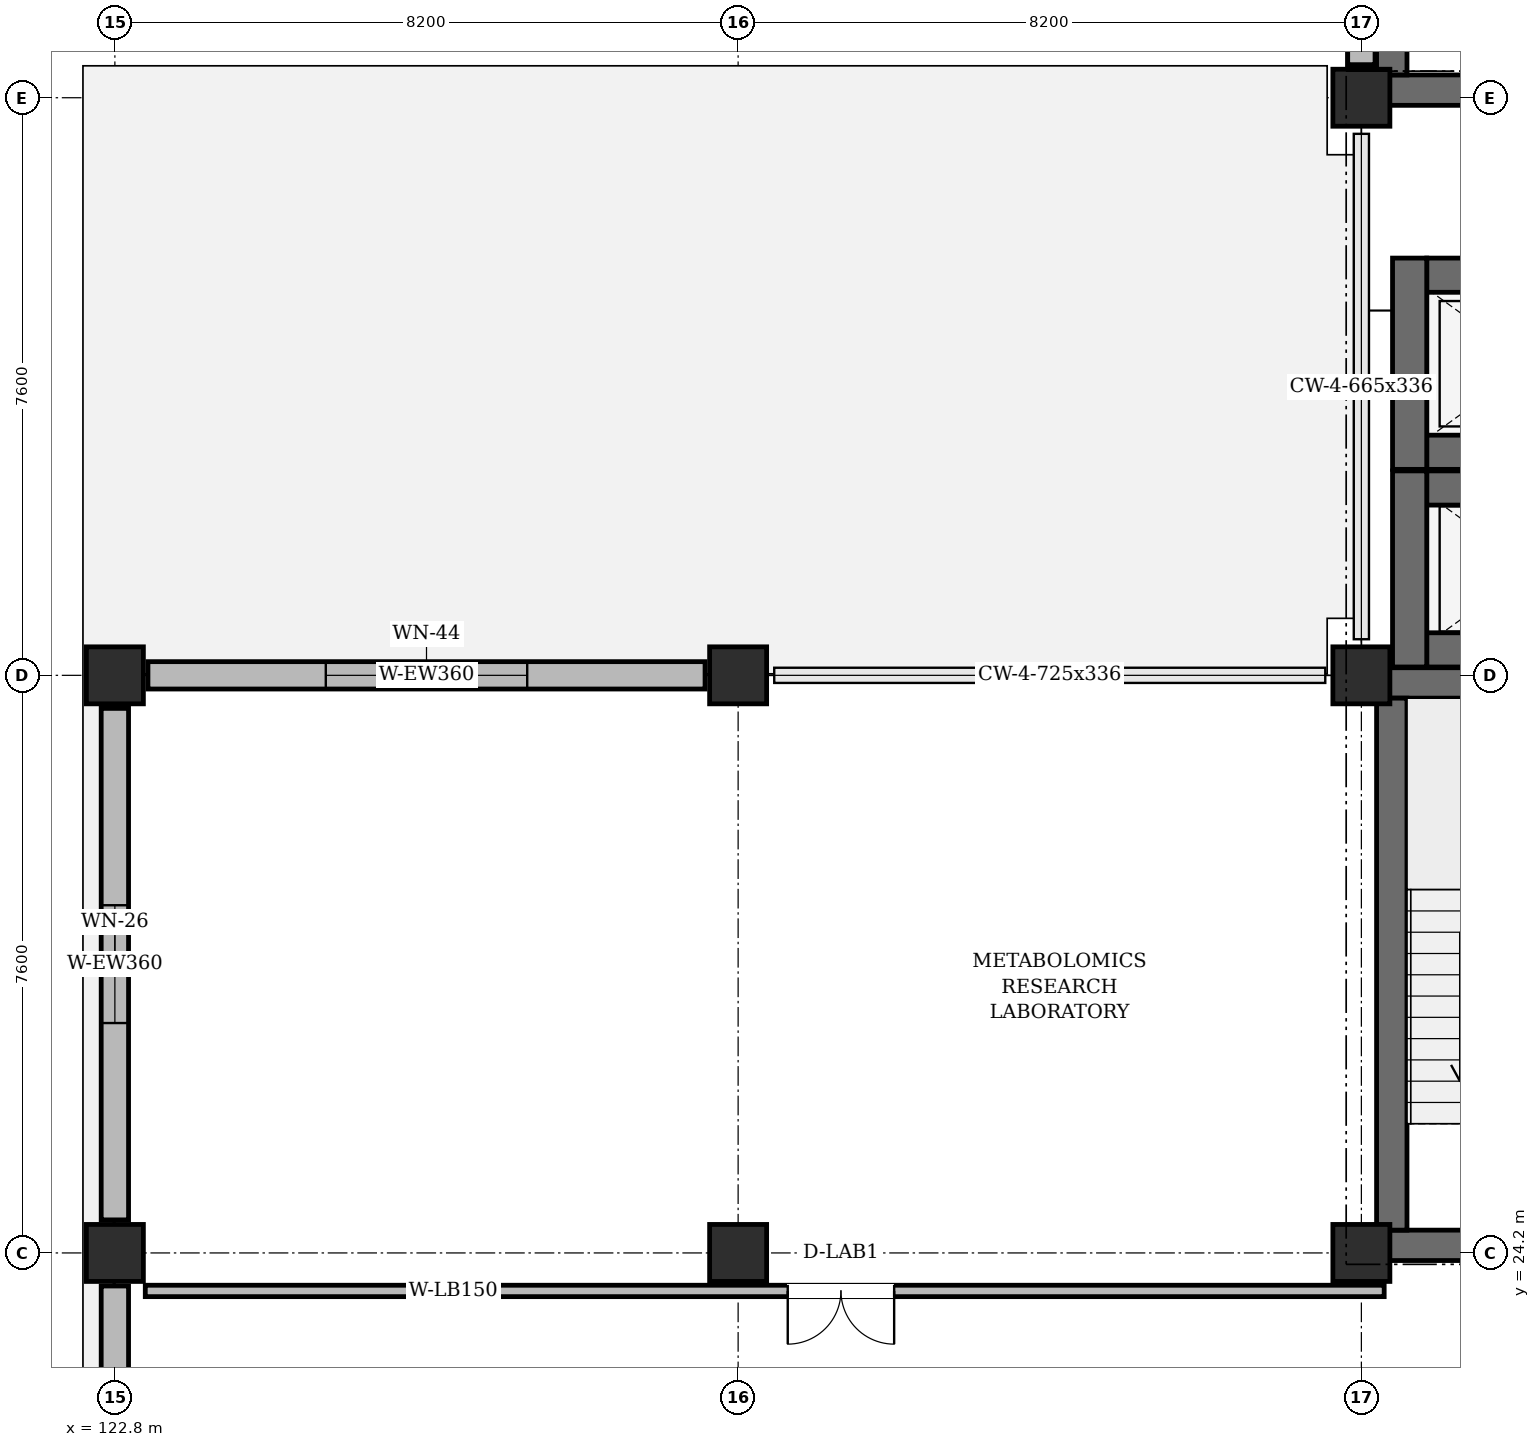
"""IFC4 building model, lengths in metres.
Left out: names, types, materials, properties, quantities, classifications, styles, units other than length and angle.
Written with IfcOpenShell. Run it as: python <this file> out.ifc"""

import sys

from ifc_helpers import new_model, si_unit, direction, frame, frame_2d, origin, origin_2d, place, context, subcontext, project, spatial, rectangle, extrude, element, fill, save


model = new_model("IFC4")
c1 = context("Model", 3, precision=1e-05, world=origin(), true_north=direction((0.0, 1.0)))
c2 = subcontext(c1, "Body", "Model", "MODEL_VIEW")
j1 = project(units=[si_unit("LENGTHUNIT", "METRE"), si_unit("PLANEANGLEUNIT", "RADIAN")], contexts=[c1])
p1 = place(None, origin())
s1 = spatial("IfcSite", under=j1, at=p1, CompositionType="ELEMENT")
p2 = place(p1, origin())
s2 = spatial("IfcBuilding", under=s1, at=p2, CompositionType="ELEMENT")
p3 = place(p2, frame((0.0, 0.0, 53.4)))
s3 = spatial("IfcBuildingStorey", under=s2, at=p3, CompositionType="ELEMENT", Elevation=53.4)
for number, where, z_axis, x_axis in (
    (1, (122.8, 24.2, 0.0), (0.0, 0.0, 1.0), (1.0, 0.0, 0.0)),
    (2, (122.8, 31.8, 0.0), (0.0, 0.0, 1.0), (1.0, 0.0, 0.0)),
    (3, (131.0, 24.2, 0.0), (0.0, 0.0, 1.0), (1.0, 0.0, 0.0)),
    (4, (131.0, 31.8, 0.0), (0.0, 0.0, 1.0), (1.0, 0.0, 0.0)),
    (5, (139.2, 24.2, 0.0), (0.0, 0.0, 1.0), (1.0, 0.0, 0.0)),
    (6, (139.2, 31.8, 0.0), (0.0, 0.0, 1.0), (1.0, 0.0, 0.0)),
    (7, (139.2, 39.4, 0.0), (0.0, 0.0, 1.0), (1.0, 0.0, 0.0)),
):
    element("IfcColumn", number, at=place(p3, frame(where, z_axis=z_axis, x_axis=x_axis)), inside=s3, PredefinedType="COLUMN", context=c2, shape_type="SweptSolid", body=[
        extrude(rectangle(XDim=0.75, YDim=0.75, at=origin_2d()), origin(), (0.0, 0.0, 1.0), 3.96),
    ])
p4 = place(p3, frame((139.2, 46.565, 0.0), z_axis=(0.0, 0.0, 1.0), x_axis=(0.0, -1.0, 0.0)))
e8 = element("IfcWall", 8, at=p4, inside=s3, PredefinedType="SOLIDWALL", context=c2, shape_type="SweptSolid", body=[
    extrude(rectangle(XDim=6.73, YDim=0.36, at=frame_2d((3.365, 0.0))), origin(), (0.0, 0.0, 1.0), 3.345),
])
p5 = place(p3, frame((130.565, 31.8, 0.0), z_axis=(0.0, 0.0, 1.0), x_axis=(-1.0, 0.0, 0.0)))
e9 = element("IfcWall", 9, at=p5, inside=s3, PredefinedType="SOLIDWALL", context=c2, shape_type="SweptSolid", body=[
    extrude(rectangle(XDim=7.33, YDim=0.36, at=frame_2d((3.665, 0.0))), origin(), (0.0, 0.0, 1.0), 3.345),
])
p6 = place(p5, frame((2.34, 0.0, 0.95)))
e10 = element("IfcOpeningElement", 10, at=p6, cuts=e9, PredefinedType="OPENING", context=c2, shape_type="SweptSolid", body=[
    extrude(rectangle(XDim=2.65, YDim=2.05, at=frame_2d((1.325, 1.025))), frame((0.0, 0.192, 0.0), z_axis=(0.0, -1.0, 0.0), x_axis=(1.0, 0.0, 0.0)), (0.0, 0.0, 1.0), 0.384),
])
p7 = place(p3, frame((122.8, 31.365, 0.0), z_axis=(0.0, 0.0, 1.0), x_axis=(0.0, -1.0, 0.0)))
e11 = element("IfcWall", 11, at=p7, inside=s3, PredefinedType="SOLIDWALL", context=c2, shape_type="SweptSolid", body=[
    extrude(rectangle(XDim=6.73, YDim=0.36, at=frame_2d((3.365, 0.0))), origin(), (0.0, 0.0, 1.0), 3.345),
])
p8 = place(p7, frame((2.59, 0.0, 0.95)))
e12 = element("IfcOpeningElement", 12, at=p8, cuts=e11, PredefinedType="OPENING", context=c2, shape_type="SweptSolid", body=[
    extrude(rectangle(XDim=1.55, YDim=1.5, at=frame_2d((0.775, 0.75))), frame((0.0, 0.192, 0.0), z_axis=(0.0, -1.0, 0.0), x_axis=(1.0, 0.0, 0.0)), (0.0, 0.0, 1.0), 0.384),
])
p9 = place(p3, frame((122.8, 23.765, 0.0), z_axis=(0.0, 0.0, 1.0), x_axis=(0.0, -1.0, 0.0)))
e13 = element("IfcWall", 13, at=p9, inside=s3, PredefinedType="SOLIDWALL", context=c2, shape_type="SweptSolid", body=[
    extrude(rectangle(XDim=6.73, YDim=0.36, at=frame_2d((3.365, 0.0))), origin(), (0.0, 0.0, 1.0), 3.345),
])
p10 = place(p9, frame((2.915, 0.0, 0.95)))
e14 = element("IfcOpeningElement", 14, at=p10, cuts=e13, PredefinedType="OPENING", context=c2, shape_type="SweptSolid", body=[
    extrude(rectangle(XDim=0.9, YDim=2.1, at=frame_2d((0.45, 1.05))), frame((0.0, 0.192, 0.0), z_axis=(0.0, -1.0, 0.0), x_axis=(1.0, 0.0, 0.0)), (0.0, 0.0, 1.0), 0.384),
])
p11 = place(p3, frame((139.4, 24.3, 0.0), z_axis=(0.0, 0.0, 1.0), x_axis=(1.0, 0.0, 0.0)))
e15 = element("IfcWall", 15, at=p11, inside=s3, PredefinedType="SHEAR", context=c2, shape_type="SweptSolid", body=[
    extrude(rectangle(XDim=3.8, YDim=0.4, at=frame_2d((1.9, 0.0))), origin(), (0.0, 0.0, 1.0), 3.96),
])
p12 = place(p11, frame((1.3, 0.0, 0.0)))
e16 = element("IfcOpeningElement", 16, at=p12, cuts=e15, PredefinedType="OPENING", context=c2, shape_type="SweptSolid", body=[
    extrude(rectangle(XDim=1.2, YDim=2.2, at=frame_2d((0.6, 1.1))), frame((0.0, 0.212, 0.0), z_axis=(0.0, -1.0, 0.0), x_axis=(1.0, 0.0, 0.0)), (0.0, 0.0, 1.0), 0.424),
])
p13 = place(p3, frame((139.4, 31.7, 0.0), z_axis=(0.0, 0.0, 1.0), x_axis=(1.0, 0.0, 0.0)))
e17 = element("IfcWall", 17, at=p13, inside=s3, PredefinedType="SHEAR", context=c2, shape_type="SweptSolid", body=[
    extrude(rectangle(XDim=3.8, YDim=0.4, at=frame_2d((1.9, 0.0))), origin(), (0.0, 0.0, 1.0), 3.96),
])
p14 = place(p3, frame((139.6, 24.5, 0.0), z_axis=(0.0, 0.0, 1.0), x_axis=(0.0, 1.0, 0.0)))
e18 = element("IfcWall", 18, at=p14, inside=s3, PredefinedType="SHEAR", context=c2, shape_type="SweptSolid", body=[
    extrude(rectangle(XDim=7.0, YDim=0.4, at=frame_2d((3.5, 0.0))), origin(), (0.0, 0.0, 1.0), 3.96),
])
p15 = place(p3, frame((139.4, 39.5, 0.0), z_axis=(0.0, 0.0, 1.0), x_axis=(1.0, 0.0, 0.0)))
e19 = element("IfcWall", 19, at=p15, inside=s3, PredefinedType="SHEAR", context=c2, shape_type="SweptSolid", body=[
    extrude(rectangle(XDim=3.8, YDim=0.4, at=frame_2d((1.9, 0.0))), origin(), (0.0, 0.0, 1.0), 3.96),
])
p16 = place(p15, frame((1.3, 0.0, 0.0)))
e20 = element("IfcOpeningElement", 20, at=p16, cuts=e19, PredefinedType="OPENING", context=c2, shape_type="SweptSolid", body=[
    extrude(rectangle(XDim=1.2, YDim=2.2, at=frame_2d((0.6, 1.1))), frame((0.0, 0.212, 0.0), z_axis=(0.0, -1.0, 0.0), x_axis=(1.0, 0.0, 0.0)), (0.0, 0.0, 1.0), 0.424),
])
p17 = place(p3, frame((139.6, 39.7, 0.0), z_axis=(0.0, 0.0, 1.0), x_axis=(0.0, 1.0, 0.0)))
e21 = element("IfcWall", 21, at=p17, inside=s3, PredefinedType="SHEAR", context=c2, shape_type="SweptSolid", body=[
    extrude(rectangle(XDim=7.0, YDim=0.4, at=frame_2d((3.5, 0.0))), origin(), (0.0, 0.0, 1.0), 3.96),
])
for number, where, z_axis, x_axis in (
    (22, (140.06, 32.135, 0.0), (0.0, 0.0, 1.0), (1.0, 0.0, 0.0)),
    (23, (140.06, 34.265, 0.0), (0.0, 0.0, 1.0), (1.0, 0.0, 0.0)),
):
    element("IfcWall", number, at=place(p3, frame(where, z_axis=z_axis, x_axis=x_axis)), inside=s3, PredefinedType="SHEAR", context=c2, shape_type="SweptSolid", body=[
        extrude(rectangle(XDim=2.74, YDim=0.45, at=frame_2d((1.37, 0.0))), origin(), (0.0, 0.0, 1.0), 3.96),
    ])
p18 = place(p3, frame((139.835, 31.91, 0.0), z_axis=(0.0, 0.0, 1.0), x_axis=(0.0, 1.0, 0.0)))
e24 = element("IfcWall", 24, at=p18, inside=s3, PredefinedType="SHEAR", context=c2, shape_type="SweptSolid", body=[
    extrude(rectangle(XDim=2.58, YDim=0.45, at=frame_2d((1.29, 0.0))), origin(), (0.0, 0.0, 1.0), 3.96),
])
for number, where, z_axis, x_axis in (
    (25, (140.06, 34.735, 0.0), (0.0, 0.0, 1.0), (1.0, 0.0, 0.0)),
    (26, (140.06, 37.065, 0.0), (0.0, 0.0, 1.0), (1.0, 0.0, 0.0)),
):
    element("IfcWall", number, at=place(p3, frame(where, z_axis=z_axis, x_axis=x_axis)), inside=s3, PredefinedType="SHEAR", context=c2, shape_type="SweptSolid", body=[
        extrude(rectangle(XDim=2.74, YDim=0.45, at=frame_2d((1.37, 0.0))), origin(), (0.0, 0.0, 1.0), 3.96),
    ])
p19 = place(p3, frame((139.835, 34.51, 0.0), z_axis=(0.0, 0.0, 1.0), x_axis=(0.0, 1.0, 0.0)))
e27 = element("IfcWall", 27, at=p19, inside=s3, PredefinedType="SHEAR", context=c2, shape_type="SweptSolid", body=[
    extrude(rectangle(XDim=2.78, YDim=0.45, at=frame_2d((1.39, 0.0))), origin(), (0.0, 0.0, 1.0), 3.96),
])
p20 = place(p3, frame((123.2, 23.7, 0.0), z_axis=(0.0, 0.0, 1.0), x_axis=(1.0, 0.0, 0.0)))
e28 = element("IfcWall", 28, at=p20, inside=s3, PredefinedType="PARTITIONING", context=c2, shape_type="SweptSolid", body=[
    extrude(rectangle(XDim=16.3, YDim=0.15, at=frame_2d((8.15, 0.0))), origin(), (0.0, 0.0, 1.0), 3.805),
])
p21 = place(p20, frame((8.453, 0.0, 0.0)))
e29 = element("IfcOpeningElement", 29, at=p21, cuts=e28, PredefinedType="OPENING", context=c2, shape_type="SweptSolid", body=[
    extrude(rectangle(XDim=1.4, YDim=2.2, at=frame_2d((0.7, 1.1))), frame((0.0, 0.087, 0.0), z_axis=(0.0, -1.0, 0.0), x_axis=(1.0, 0.0, 0.0)), (0.0, 0.0, 1.0), 0.174),
])
p22 = place(p6, origin())
e30 = element("IfcWindow", 30, at=p22, inside=s3, PartitioningType="DOUBLE_PANEL_VERTICAL", PredefinedType="WINDOW", context=c2, shape_type="SweptSolid", body=[
    extrude(rectangle(XDim=2.65, YDim=2.05, at=frame_2d((1.325, 1.025))), frame((0.0, 0.03, 0.0), z_axis=(0.0, -1.0, 0.0), x_axis=(1.0, 0.0, 0.0)), (0.0, 0.0, 1.0), 0.06),
])
fill(e10, e30)
p23 = place(p8, origin())
e31 = element("IfcWindow", 31, at=p23, inside=s3, PartitioningType="DOUBLE_PANEL_VERTICAL", PredefinedType="WINDOW", context=c2, shape_type="SweptSolid", body=[
    extrude(rectangle(XDim=1.55, YDim=1.5, at=frame_2d((0.775, 0.75))), frame((0.0, 0.03, 0.0), z_axis=(0.0, -1.0, 0.0), x_axis=(1.0, 0.0, 0.0)), (0.0, 0.0, 1.0), 0.06),
])
fill(e12, e31)
p24 = place(p21, frame((1.4, 0.0, 0.0), z_axis=(0.0, 0.0, 1.0), x_axis=(-1.0, 0.0, 0.0)))
e32 = element("IfcDoor", 32, at=p24, inside=s3, OperationType="DOUBLE_DOOR_SINGLE_SWING", PredefinedType="DOOR", context=c2, shape_type="SweptSolid", body=[
    extrude(rectangle(XDim=1.4, YDim=2.2, at=frame_2d((0.7, 1.1))), frame((0.0, 0.025, 0.0), z_axis=(0.0, -1.0, 0.0), x_axis=(1.0, 0.0, 0.0)), (0.0, 0.0, 1.0), 0.05),
])
fill(e29, e32)
save(model, sys.argv[1])
